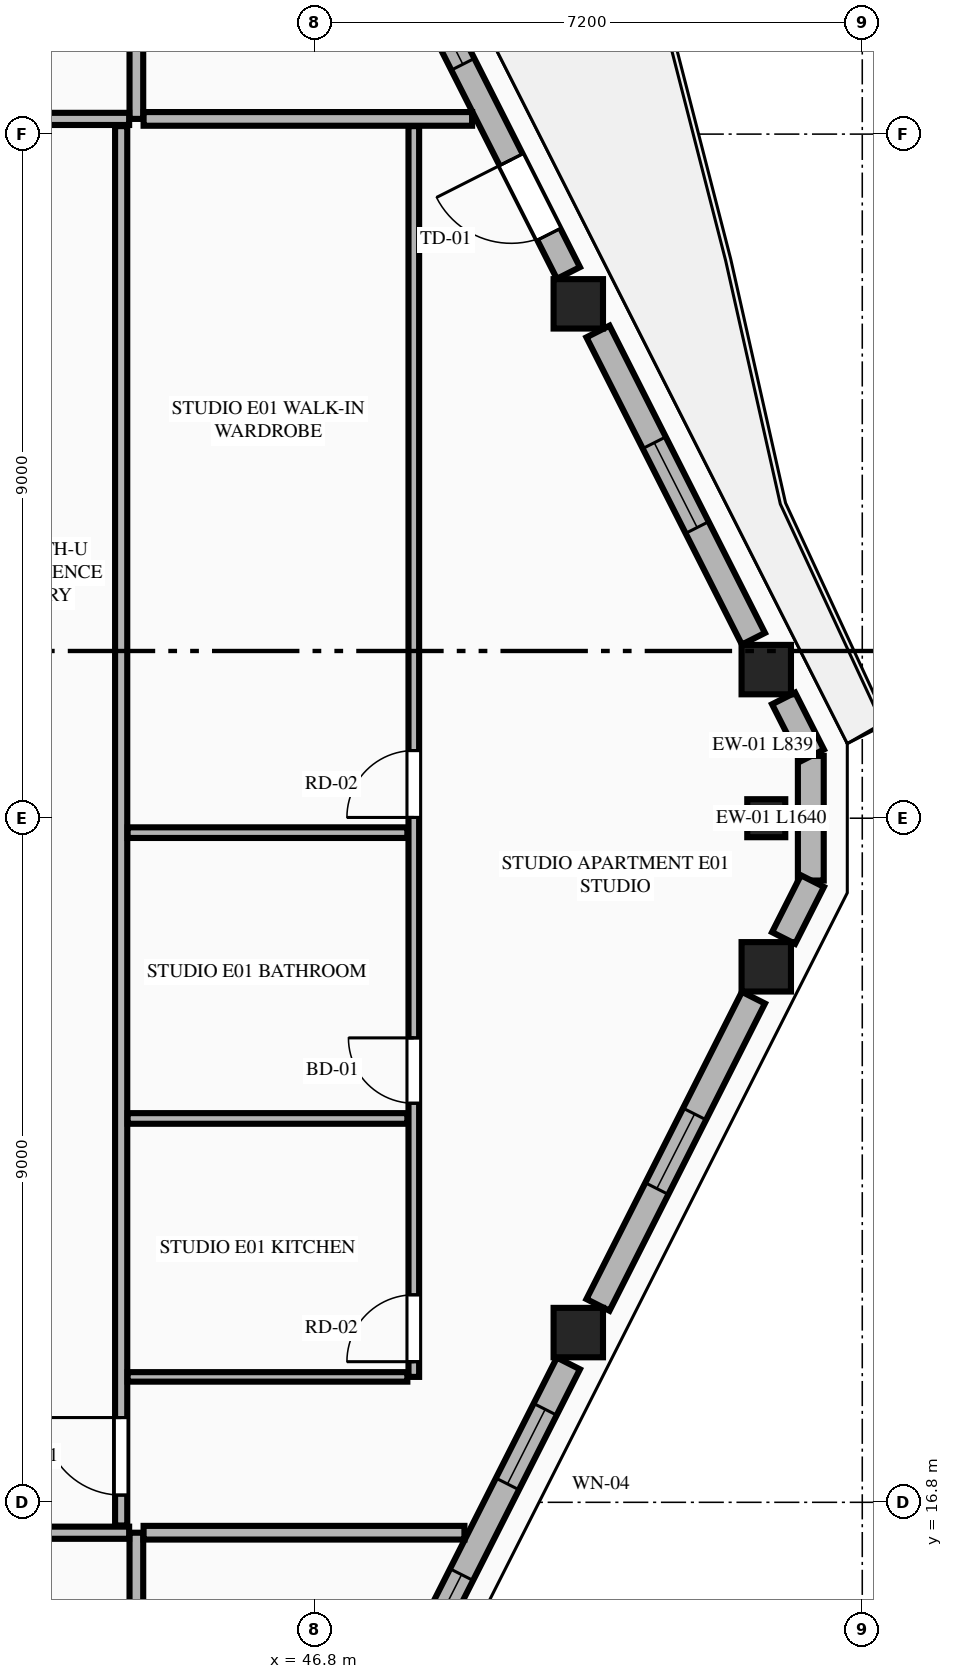
"""IFC4 building model, lengths in metres.
Left out: names, types, materials, properties, quantities, classifications, styles, units other than length and angle.
Written with IfcOpenShell. Run it as: python <this file> out.ifc"""

import sys

from ifc_helpers import new_model, si_unit, direction, frame, frame_2d, origin, origin_2d, place, context, subcontext, project, spatial, rectangle, extrude, element, fill, save


model = new_model("IFC4")
c1 = context("Model", 3, precision=1e-05, world=origin(), true_north=direction((0.0, 1.0)))
c2 = subcontext(c1, "Body", "Model", "MODEL_VIEW")
j1 = project(units=[si_unit("LENGTHUNIT", "METRE"), si_unit("PLANEANGLEUNIT", "RADIAN")], contexts=[c1])
p1 = place(None, origin())
s1 = spatial("IfcSite", under=j1, at=p1, CompositionType="ELEMENT")
p2 = place(p1, origin())
s2 = spatial("IfcBuilding", under=s1, at=p2, CompositionType="ELEMENT")
p3 = place(p2, frame((0.0, 0.0, 267.15)))
s3 = spatial("IfcBuildingStorey", under=s2, at=p3, CompositionType="ELEMENT", Elevation=267.15)
for number, where, z_axis, x_axis in (
    (1, (50.264, 19.033, 0.0), (0.0, 0.0, 1.0), (1.0, 0.0, 0.0)),
    (2, (52.737, 23.845, 0.0), (0.0, 0.0, 1.0), (1.0, 0.0, 0.0)),
    (3, (52.737, 27.755, 0.0), (0.0, 0.0, 1.0), (1.0, 0.0, 0.0)),
    (4, (50.264, 32.567, 0.0), (0.0, 0.0, 1.0), (1.0, 0.0, 0.0)),
):
    element("IfcColumn", number, at=place(p3, frame(where, z_axis=z_axis, x_axis=x_axis)), inside=s3, PredefinedType="COLUMN", context=c2, shape_type="SweptSolid", body=[
        extrude(rectangle(XDim=0.65, YDim=0.65, at=origin_2d()), origin(), (0.0, 0.0, 1.0), 3.65),
    ])
p4 = place(p3, frame((52.737, 25.8, 0.0), z_axis=(0.0, 0.0, 1.0), x_axis=(0.0, 1.0, 0.0)))
e5 = element("IfcColumn", 5, at=p4, inside=s3, PredefinedType="PILASTER", context=c2, shape_type="SweptSolid", body=[
    extrude(rectangle(XDim=0.5, YDim=0.35, at=origin_2d()), origin(), (0.0, 0.0, 1.0), 3.65),
])
p5 = place(p3, frame((53.323, 24.98, 0.0), z_axis=(0.0, 0.0, 1.0), x_axis=(0.0, 1.0, 0.0)))
e6 = element("IfcWall", 6, at=p5, inside=s3, PredefinedType="STANDARD", context=c2, shape_type="SweptSolid", body=[
    extrude(rectangle(XDim=1.64, YDim=0.34, at=frame_2d((0.82, 0.0))), origin(), (0.0, 0.0, 1.0), 3.45),
])
p6 = place(p3, frame((48.002, 14.413, 0.0), z_axis=(0.0, 0.0, 1.0), x_axis=(0.451468341582, 0.892287137949, 0.0)))
e7 = element("IfcWall", 7, at=p6, inside=s3, PredefinedType="STANDARD", context=c2, shape_type="SweptSolid", body=[
    extrude(rectangle(XDim=4.723, YDim=0.34, at=frame_2d((2.361, 0.0))), origin(), (0.0, 0.0, 1.0), 2.983),
])
p7 = place(p6, frame((0.359, 0.0, 0.75)))
e8 = element("IfcOpeningElement", 8, at=p7, cuts=e7, PredefinedType="OPENING", context=c2, shape_type="SweptSolid", body=[
    extrude(rectangle(XDim=1.25, YDim=1.95, at=frame_2d((0.625, 0.975))), frame((0.0, 0.18, 0.0), z_axis=(0.0, -1.0, 0.0), x_axis=(1.0, 0.0, 0.0)), (0.0, 0.0, 1.0), 0.36),
])
p8 = place(p6, frame((2.946, 0.0, 0.75)))
e9 = element("IfcOpeningElement", 9, at=p8, cuts=e7, PredefinedType="OPENING", context=c2, shape_type="SweptSolid", body=[
    extrude(rectangle(XDim=1.1, YDim=2.0, at=frame_2d((0.55, 1.0))), frame((0.0, 0.18, 0.0), z_axis=(0.0, -1.0, 0.0), x_axis=(1.0, 0.0, 0.0)), (0.0, 0.0, 1.0), 0.36),
])
p9 = place(p3, frame((50.523, 19.397, 0.0), z_axis=(0.0, 0.0, 1.0), x_axis=(0.45147697324, 0.892282770558, 0.0)))
e10 = element("IfcWall", 10, at=p9, inside=s3, PredefinedType="STANDARD", context=c2, shape_type="SweptSolid", body=[
    extrude(rectangle(XDim=4.53, YDim=0.34, at=frame_2d((2.265, 0.0))), origin(), (0.0, 0.0, 1.0), 2.983),
])
p10 = place(p9, frame((1.715, 0.0, 0.75)))
e11 = element("IfcOpeningElement", 11, at=p10, cuts=e10, PredefinedType="OPENING", context=c2, shape_type="SweptSolid", body=[
    extrude(rectangle(XDim=1.1, YDim=2.0, at=frame_2d((0.55, 1.0))), frame((0.0, 0.18, 0.0), z_axis=(0.0, -1.0, 0.0), x_axis=(1.0, 0.0, 0.0)), (0.0, 0.0, 1.0), 0.36),
])
p11 = place(p3, frame((52.965, 24.224, 0.0), z_axis=(0.0, 0.0, 1.0), x_axis=(0.4515140893, 0.892263989615, 0.0)))
e12 = element("IfcWall", 12, at=p11, inside=s3, PredefinedType="STANDARD", context=c2, shape_type="SweptSolid", body=[
    extrude(rectangle(XDim=0.839, YDim=0.34, at=frame_2d((0.419, 0.0))), origin(), (0.0, 0.0, 1.0), 3.45),
])
p12 = place(p3, frame((53.344, 26.627, 0.0), z_axis=(0.0, 0.0, 1.0), x_axis=(-0.45139691133, 0.892323275748, 0.0)))
e13 = element("IfcWall", 13, at=p12, inside=s3, PredefinedType="STANDARD", context=c2, shape_type="SweptSolid", body=[
    extrude(rectangle(XDim=0.839, YDim=0.34, at=frame_2d((0.42, 0.0))), origin(), (0.0, 0.0, 1.0), 3.45),
])
p13 = place(p3, frame((52.568, 28.161, 0.0), z_axis=(0.0, 0.0, 1.0), x_axis=(-0.45147697324, 0.892282770558, 0.0)))
e14 = element("IfcWall", 14, at=p13, inside=s3, PredefinedType="STANDARD", context=c2, shape_type="SweptSolid", body=[
    extrude(rectangle(XDim=4.53, YDim=0.34, at=frame_2d((2.265, 0.0))), origin(), (0.0, 0.0, 1.0), 2.983),
])
p14 = place(p13, frame((1.64, 0.0, 0.75)))
e15 = element("IfcOpeningElement", 15, at=p14, cuts=e14, PredefinedType="OPENING", context=c2, shape_type="SweptSolid", body=[
    extrude(rectangle(XDim=1.25, YDim=1.95, at=frame_2d((0.625, 0.975))), frame((0.0, 0.18, 0.0), z_axis=(0.0, -1.0, 0.0), x_axis=(1.0, 0.0, 0.0)), (0.0, 0.0, 1.0), 0.36),
])
p15 = place(p3, frame((50.134, 32.973, 0.0), z_axis=(0.0, 0.0, 1.0), x_axis=(-0.451447516904, 0.892297674255, 0.0)))
e16 = element("IfcWall", 16, at=p15, inside=s3, PredefinedType="STANDARD", context=c2, shape_type="SweptSolid", body=[
    extrude(rectangle(XDim=4.723, YDim=0.34, at=frame_2d((2.361, 0.0))), origin(), (0.0, 0.0, 1.0), 2.983),
])
p16 = place(p15, frame((0.57, 0.0, 0.0)))
e17 = element("IfcOpeningElement", 17, at=p16, cuts=e16, PredefinedType="OPENING", context=c2, shape_type="SweptSolid", body=[
    extrude(rectangle(XDim=1.1, YDim=2.25, at=frame_2d((0.55, 1.125))), frame((0.0, 0.18, 0.0), z_axis=(0.0, -1.0, 0.0), x_axis=(1.0, 0.0, 0.0)), (0.0, 0.0, 1.0), 0.36),
])
p17 = place(p15, frame((3.077, 0.0, 0.75)))
e18 = element("IfcOpeningElement", 18, at=p17, cuts=e16, PredefinedType="OPENING", context=c2, shape_type="SweptSolid", body=[
    extrude(rectangle(XDim=1.1, YDim=2.0, at=frame_2d((0.55, 1.0))), frame((0.0, 0.18, 0.0), z_axis=(0.0, -1.0, 0.0), x_axis=(1.0, 0.0, 0.0)), (0.0, 0.0, 1.0), 0.36),
])
p18 = place(p3, frame((44.45, 8.119, 0.0), z_axis=(0.0, 0.0, 1.0), x_axis=(0.0, 1.0, 0.0)))
e19 = element("IfcWall", 19, at=p18, inside=s3, PredefinedType="PARTITIONING", context=c2, shape_type="SweptSolid", body=[
    extrude(rectangle(XDim=8.281, YDim=0.18, at=frame_2d((4.141, 0.0))), origin(), (0.0, 0.0, 1.0), 3.45),
])
p19 = place(p3, frame((20.445, 16.4, 0.0), z_axis=(0.0, 0.0, 1.0), x_axis=(1.0, 0.0, 0.0)))
e20 = element("IfcWall", 20, at=p19, inside=s3, PredefinedType="PARTITIONING", context=c2, shape_type="SweptSolid", body=[
    extrude(rectangle(XDim=23.91, YDim=0.16, at=frame_2d((11.955, 0.0))), origin(), (0.0, 0.0, 1.0), 3.45),
])
p20 = place(p19, frame((0.705, 0.0, 0.0)))
e21 = element("IfcOpeningElement", 21, at=p20, cuts=e20, PredefinedType="OPENING", context=c2, shape_type="SweptSolid", body=[
    extrude(rectangle(XDim=1.02, YDim=2.25, at=frame_2d((0.51, 1.125))), frame((0.0, 0.09, 0.0), z_axis=(0.0, -1.0, 0.0), x_axis=(1.0, 0.0, 0.0)), (0.0, 0.0, 1.0), 0.18),
])
p21 = place(p3, frame((44.45, 35.0, 0.0), z_axis=(0.0, 0.0, 1.0), x_axis=(0.0, 1.0, 0.0)))
e22 = element("IfcWall", 22, at=p21, inside=s3, PredefinedType="PARTITIONING", context=c2, shape_type="SweptSolid", body=[
    extrude(rectangle(XDim=8.481, YDim=0.18, at=frame_2d((4.24, 0.0))), origin(), (0.0, 0.0, 1.0), 3.45),
])
p22 = place(p3, frame((20.445, 35.0, 0.0), z_axis=(0.0, 0.0, 1.0), x_axis=(1.0, 0.0, 0.0)))
e23 = element("IfcWall", 23, at=p22, inside=s3, PredefinedType="PARTITIONING", context=c2, shape_type="SweptSolid", body=[
    extrude(rectangle(XDim=23.91, YDim=0.16, at=frame_2d((11.955, 0.0))), origin(), (0.0, 0.0, 1.0), 3.45),
])
p23 = place(p22, frame((0.405, 0.0, 0.0)))
e24 = element("IfcOpeningElement", 24, at=p23, cuts=e23, PredefinedType="OPENING", context=c2, shape_type="SweptSolid", body=[
    extrude(rectangle(XDim=1.35, YDim=2.35, at=frame_2d((0.675, 1.175))), frame((0.0, 0.09, 0.0), z_axis=(0.0, -1.0, 0.0), x_axis=(1.0, 0.0, 0.0)), (0.0, 0.0, 1.0), 0.18),
])
p24 = place(p3, frame((44.545, 16.4, 0.0), z_axis=(0.0, 0.0, 1.0), x_axis=(1.0, 0.0, 0.0)))
e25 = element("IfcWall", 25, at=p24, inside=s3, PredefinedType="PARTITIONING", context=c2, shape_type="SweptSolid", body=[
    extrude(rectangle(XDim=4.221, YDim=0.18, at=frame_2d((2.111, 0.0))), origin(), (0.0, 0.0, 1.0), 3.45),
])
p25 = place(p3, frame((44.545, 35.0, 0.0), z_axis=(0.0, 0.0, 1.0), x_axis=(1.0, 0.0, 0.0)))
e26 = element("IfcWall", 26, at=p25, inside=s3, PredefinedType="PARTITIONING", context=c2, shape_type="SweptSolid", body=[
    extrude(rectangle(XDim=4.322, YDim=0.18, at=frame_2d((2.161, 0.0))), origin(), (0.0, 0.0, 1.0), 3.45),
])
p26 = place(p3, frame((44.25, 16.495, 0.0), z_axis=(0.0, 0.0, 1.0), x_axis=(0.0, 1.0, 0.0)))
e27 = element("IfcWall", 27, at=p26, inside=s3, PredefinedType="PARTITIONING", context=c2, shape_type="SweptSolid", body=[
    extrude(rectangle(XDim=18.41, YDim=0.16, at=frame_2d((9.205, 0.0))), origin(), (0.0, 0.0, 1.0), 3.137),
])
p27 = place(p26, frame((0.4, 0.0, 0.0)))
e28 = element("IfcOpeningElement", 28, at=p27, cuts=e27, PredefinedType="OPENING", context=c2, shape_type="SweptSolid", body=[
    extrude(rectangle(XDim=1.02, YDim=2.25, at=frame_2d((0.51, 1.125))), frame((0.0, 0.09, 0.0), z_axis=(0.0, -1.0, 0.0), x_axis=(1.0, 0.0, 0.0)), (0.0, 0.0, 1.0), 0.18),
])
p28 = place(p3, frame((44.335, 18.45, 0.0), z_axis=(0.0, 0.0, 1.0), x_axis=(1.0, 0.0, 0.0)))
e29 = element("IfcWall", 29, at=p28, inside=s3, PredefinedType="PARTITIONING", context=c2, shape_type="SweptSolid", body=[
    extrude(rectangle(XDim=3.68, YDim=0.125, at=frame_2d((1.84, 0.0))), origin(), (0.0, 0.0, 1.0), 3.45),
])
p29 = place(p3, frame((48.1, 18.45, 0.0), z_axis=(0.0, 0.0, 1.0), x_axis=(0.0, 1.0, 0.0)))
e30 = element("IfcWall", 30, at=p29, inside=s3, PredefinedType="PLUMBINGWALL", context=c2, shape_type="SweptSolid", body=[
    extrude(rectangle(XDim=16.455, YDim=0.14, at=frame_2d((8.228, 0.0))), origin(), (0.0, 0.0, 1.0), 3.45),
])
p30 = place(p29, frame((3.6, 0.0, 0.0)))
e31 = element("IfcOpeningElement", 31, at=p30, cuts=e30, PredefinedType="OPENING", context=c2, shape_type="SweptSolid", body=[
    extrude(rectangle(XDim=0.86, YDim=2.1, at=frame_2d((0.43, 1.05))), frame((0.0, 0.08, 0.0), z_axis=(0.0, -1.0, 0.0), x_axis=(1.0, 0.0, 0.0)), (0.0, 0.0, 1.0), 0.16),
])
p31 = place(p29, frame((7.36, 0.0, 0.0)))
e32 = element("IfcOpeningElement", 32, at=p31, cuts=e30, PredefinedType="OPENING", context=c2, shape_type="SweptSolid", body=[
    extrude(rectangle(XDim=0.88, YDim=2.15, at=frame_2d((0.44, 1.075))), frame((0.0, 0.08, 0.0), z_axis=(0.0, -1.0, 0.0), x_axis=(1.0, 0.0, 0.0)), (0.0, 0.0, 1.0), 0.16),
])
p32 = place(p29, frame((0.2, 0.0, 0.0)))
e33 = element("IfcOpeningElement", 33, at=p32, cuts=e30, PredefinedType="OPENING", context=c2, shape_type="SweptSolid", body=[
    extrude(rectangle(XDim=0.88, YDim=2.15, at=frame_2d((0.44, 1.075))), frame((0.0, 0.08, 0.0), z_axis=(0.0, -1.0, 0.0), x_axis=(1.0, 0.0, 0.0)), (0.0, 0.0, 1.0), 0.16),
])
for number, where, z_axis, x_axis in (
    (34, (44.335, 21.85, 0.0), (0.0, 0.0, 1.0), (1.0, 0.0, 0.0)),
    (35, (44.335, 25.61, 0.0), (0.0, 0.0, 1.0), (1.0, 0.0, 0.0)),
):
    element("IfcWall", number, at=place(p3, frame(where, z_axis=z_axis, x_axis=x_axis)), inside=s3, PredefinedType="PLUMBINGWALL", context=c2, shape_type="SweptSolid", body=[
        extrude(rectangle(XDim=3.68, YDim=0.14, at=frame_2d((1.84, 0.0))), origin(), (0.0, 0.0, 1.0), 3.45),
    ])
p33 = place(p7, origin())
e36 = element("IfcWindow", 36, at=p33, inside=s3, PartitioningType="SINGLE_PANEL", PredefinedType="WINDOW", context=c2, shape_type="SweptSolid", body=[
    extrude(rectangle(XDim=1.25, YDim=1.95, at=frame_2d((0.625, 0.975))), frame((0.0, 0.03, 0.0), z_axis=(0.0, -1.0, 0.0), x_axis=(1.0, 0.0, 0.0)), (0.0, 0.0, 1.0), 0.06),
])
fill(e8, e36)
p34 = place(p10, origin())
e37 = element("IfcWindow", 37, at=p34, inside=s3, PartitioningType="SINGLE_PANEL", PredefinedType="WINDOW", context=c2, shape_type="SweptSolid", body=[
    extrude(rectangle(XDim=1.1, YDim=2.0, at=frame_2d((0.55, 1.0))), frame((0.0, 0.03, 0.0), z_axis=(0.0, -1.0, 0.0), x_axis=(1.0, 0.0, 0.0)), (0.0, 0.0, 1.0), 0.06),
])
fill(e11, e37)
p35 = place(p14, origin())
e38 = element("IfcWindow", 38, at=p35, inside=s3, PartitioningType="SINGLE_PANEL", PredefinedType="WINDOW", context=c2, shape_type="SweptSolid", body=[
    extrude(rectangle(XDim=1.25, YDim=1.95, at=frame_2d((0.625, 0.975))), frame((0.0, 0.03, 0.0), z_axis=(0.0, -1.0, 0.0), x_axis=(1.0, 0.0, 0.0)), (0.0, 0.0, 1.0), 0.06),
])
fill(e15, e38)
p36 = place(p16, origin())
e39 = element("IfcDoor", 39, at=p36, inside=s3, OperationType="SINGLE_SWING_RIGHT", PredefinedType="DOOR", context=c2, shape_type="SweptSolid", body=[
    extrude(rectangle(XDim=1.1, YDim=2.25, at=frame_2d((0.55, 1.125))), frame((0.0, 0.025, 0.0), z_axis=(0.0, -1.0, 0.0), x_axis=(1.0, 0.0, 0.0)), (0.0, 0.0, 1.0), 0.05),
])
fill(e17, e39)
p37 = place(p30, origin())
e40 = element("IfcDoor", 40, at=p37, inside=s3, OperationType="SINGLE_SWING_RIGHT", PredefinedType="DOOR", context=c2, shape_type="SweptSolid", body=[
    extrude(rectangle(XDim=0.86, YDim=2.1, at=frame_2d((0.43, 1.05))), frame((0.0, 0.025, 0.0), z_axis=(0.0, -1.0, 0.0), x_axis=(1.0, 0.0, 0.0)), (0.0, 0.0, 1.0), 0.05),
])
fill(e31, e40)
p38 = place(p31, origin())
e41 = element("IfcDoor", 41, at=p38, inside=s3, OperationType="SINGLE_SWING_LEFT", PredefinedType="DOOR", context=c2, shape_type="SweptSolid", body=[
    extrude(rectangle(XDim=0.88, YDim=2.15, at=frame_2d((0.44, 1.075))), frame((0.0, 0.025, 0.0), z_axis=(0.0, -1.0, 0.0), x_axis=(1.0, 0.0, 0.0)), (0.0, 0.0, 1.0), 0.05),
])
fill(e32, e41)
p39 = place(p27, origin())
e42 = element("IfcDoor", 42, at=p39, inside=s3, OperationType="SINGLE_SWING_RIGHT", PredefinedType="DOOR", context=c2, shape_type="SweptSolid", body=[
    extrude(rectangle(XDim=1.02, YDim=2.25, at=frame_2d((0.51, 1.125))), frame((0.0, 0.025, 0.0), z_axis=(0.0, -1.0, 0.0), x_axis=(1.0, 0.0, 0.0)), (0.0, 0.0, 1.0), 0.05),
])
fill(e28, e42)
p40 = place(p32, origin())
e43 = element("IfcDoor", 43, at=p40, inside=s3, OperationType="SINGLE_SWING_LEFT", PredefinedType="DOOR", context=c2, shape_type="SweptSolid", body=[
    extrude(rectangle(XDim=0.88, YDim=2.15, at=frame_2d((0.44, 1.075))), frame((0.0, 0.025, 0.0), z_axis=(0.0, -1.0, 0.0), x_axis=(1.0, 0.0, 0.0)), (0.0, 0.0, 1.0), 0.05),
])
fill(e33, e43)
p41 = place(p8, origin())
e44 = element("IfcWindow", 44, at=p41, inside=s3, PartitioningType="SINGLE_PANEL", PredefinedType="WINDOW", context=c2, shape_type="SweptSolid", body=[
    extrude(rectangle(XDim=1.1, YDim=2.0, at=frame_2d((0.55, 1.0))), frame((0.0, 0.03, 0.0), z_axis=(0.0, -1.0, 0.0), x_axis=(1.0, 0.0, 0.0)), (0.0, 0.0, 1.0), 0.06),
])
fill(e9, e44)
p42 = place(p17, origin())
e45 = element("IfcWindow", 45, at=p42, inside=s3, PartitioningType="SINGLE_PANEL", PredefinedType="WINDOW", context=c2, shape_type="SweptSolid", body=[
    extrude(rectangle(XDim=1.1, YDim=2.0, at=frame_2d((0.55, 1.0))), frame((0.0, 0.03, 0.0), z_axis=(0.0, -1.0, 0.0), x_axis=(1.0, 0.0, 0.0)), (0.0, 0.0, 1.0), 0.06),
])
fill(e18, e45)
save(model, sys.argv[1])
